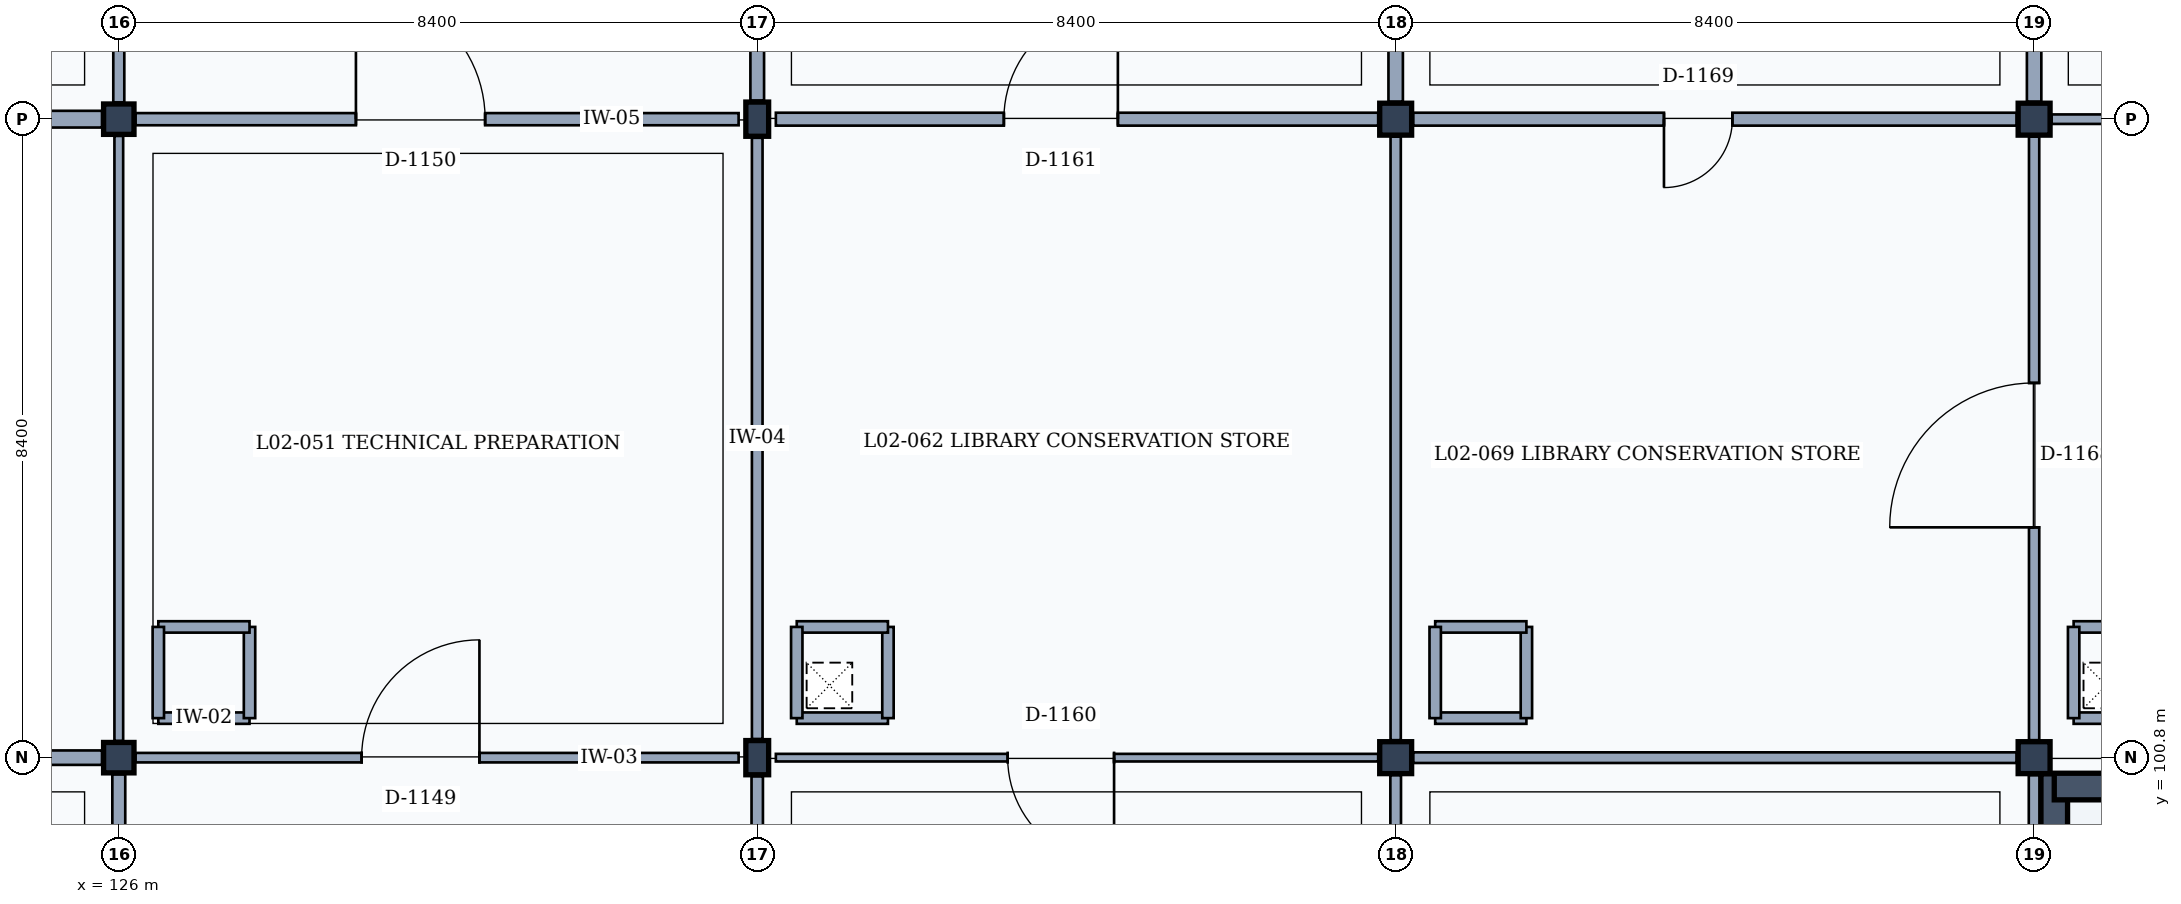
"""IFC4 building model, lengths in metres.
Left out: names, types, materials, properties, quantities, classifications, styles, units other than length and angle.
Written with IfcOpenShell. Run it as: python <this file> out.ifc"""

import sys

from ifc_helpers import new_model, si_unit, direction, frame, frame_2d, origin, origin_2d, place, context, subcontext, project, spatial, rectangle, i_section, extrude, element, fill, save


model = new_model("IFC4")
c1 = context("Model", 3, precision=1e-05, world=origin(), true_north=direction((0.0, 1.0)))
c2 = subcontext(c1, "Body", "Model", "MODEL_VIEW")
j1 = project(units=[si_unit("LENGTHUNIT", "METRE"), si_unit("PLANEANGLEUNIT", "RADIAN")], contexts=[c1])
p1 = place(None, origin())
s1 = spatial("IfcSite", under=j1, at=p1, CompositionType="ELEMENT")
p2 = place(p1, origin())
s2 = spatial("IfcBuilding", under=s1, at=p2, CompositionType="ELEMENT")
p3 = place(p2, frame((0.0, 0.0, 9.6)))
s3 = spatial("IfcBuildingStorey", under=s2, at=p3, CompositionType="ELEMENT", Elevation=9.6)
for number, where, z_axis, x_axis in (
    (1, (126.0, 100.8, 0.0), (0.0, 0.0, 1.0), (1.0, 0.0, 0.0)),
    (2, (126.0, 109.2, 0.0), (0.0, 0.0, 1.0), (1.0, 0.0, 0.0)),
):
    element("IfcColumn", number, at=place(p3, frame(where, z_axis=z_axis, x_axis=x_axis)), inside=s3, PredefinedType="COLUMN", context=c2, shape_type="SweptSolid", body=[
        extrude(rectangle(XDim=0.4, YDim=0.4, at=origin_2d()), origin(), (0.0, 0.0, 1.0), 4.2),
    ])
for number, where, z_axis, x_axis in (
    (3, (134.4, 100.8, 0.0), (0.0, 0.0, 1.0), (1.0, 0.0, 0.0)),
    (4, (134.4, 109.2, 0.0), (0.0, 0.0, 1.0), (1.0, 0.0, 0.0)),
):
    element("IfcColumn", number, at=place(p3, frame(where, z_axis=z_axis, x_axis=x_axis)), inside=s3, PredefinedType="COLUMN", context=c2, shape_type="SweptSolid", body=[
        extrude(i_section(OverallWidth=0.3, OverallDepth=0.45, WebThickness=0.014, FlangeThickness=0.026, FilletRadius=0.027, at=origin_2d()), origin(), (0.0, 0.0, 1.0), 4.2),
    ])
for number, where, z_axis, x_axis in (
    (5, (142.8, 100.8, 0.0), (0.0, 0.0, 1.0), (1.0, 0.0, 0.0)),
    (6, (142.8, 109.2, 0.0), (0.0, 0.0, 1.0), (1.0, 0.0, 0.0)),
    (7, (151.2, 100.8, 0.0), (0.0, 0.0, 1.0), (1.0, 0.0, 0.0)),
    (8, (151.2, 109.2, 0.0), (0.0, 0.0, 1.0), (1.0, 0.0, 0.0)),
):
    element("IfcColumn", number, at=place(p3, frame(where, z_axis=z_axis, x_axis=x_axis)), inside=s3, PredefinedType="COLUMN", context=c2, shape_type="SweptSolid", body=[
        extrude(rectangle(XDim=0.42, YDim=0.42, at=origin_2d()), origin(), (0.0, 0.0, 1.0), 4.2),
    ])
p4 = place(p3, frame((151.465, 92.65, 0.0), z_axis=(0.0, 0.0, 1.0), x_axis=(0.0, 1.0, 0.0)))
e9 = element("IfcWall", 9, at=p4, inside=s3, PredefinedType="SHEAR", context=c2, shape_type="SweptSolid", body=[
    extrude(rectangle(XDim=7.94, YDim=0.35, at=frame_2d((3.97, 0.0))), origin(), (0.0, 0.0, 1.0), 3.96),
])
p5 = place(p3, frame((151.465, 100.42, 0.0), z_axis=(0.0, 0.0, 1.0), x_axis=(1.0, 0.0, 0.0)))
e10 = element("IfcWall", 10, at=p5, inside=s3, PredefinedType="SHEAR", context=c2, shape_type="SweptSolid", body=[
    extrude(rectangle(XDim=7.875, YDim=0.35, at=frame_2d((3.938, 0.0))), origin(), (0.0, 0.0, 1.0), 3.96),
])
for number, where, z_axis, x_axis in (
    (11, (126.52, 101.32, 0.0), (0.0, 0.0, 1.0), (1.0, 0.0, 0.0)),
    (12, (127.72, 101.32, 0.0), (0.0, 0.0, 1.0), (0.0, 1.0, 0.0)),
    (13, (127.72, 102.52, 0.0), (0.0, 0.0, 1.0), (-1.0, 0.0, 0.0)),
    (14, (126.52, 102.52, 0.0), (0.0, 0.0, 1.0), (0.0, -1.0, 0.0)),
):
    element("IfcWall", number, at=place(p3, frame(where, z_axis=z_axis, x_axis=x_axis)), inside=s3, PredefinedType="PARTITIONING", context=c2, shape_type="SweptSolid", body=[
        extrude(rectangle(XDim=1.2, YDim=0.15, at=frame_2d((0.6, 0.0))), origin(), (0.0, 0.0, 1.0), 3.96),
    ])
p6 = place(p3, frame((134.92, 101.32, 0.0), z_axis=(0.0, 0.0, 1.0), x_axis=(1.0, 0.0, 0.0)))
e15 = element("IfcWall", 15, at=p6, inside=s3, PredefinedType="PARTITIONING", context=c2, shape_type="SweptSolid", body=[
    extrude(rectangle(XDim=1.2, YDim=0.15, at=frame_2d((0.6, 0.0))), origin(), (0.0, 0.0, 1.0), 3.94),
])
p7 = place(p3, frame((136.12, 101.32, 0.0), z_axis=(0.0, 0.0, 1.0), x_axis=(0.0, 1.0, 0.0)))
e16 = element("IfcWall", 16, at=p7, inside=s3, PredefinedType="PARTITIONING", context=c2, shape_type="SweptSolid", body=[
    extrude(rectangle(XDim=1.2, YDim=0.15, at=frame_2d((0.6, 0.0))), origin(), (0.0, 0.0, 1.0), 3.94),
])
p8 = place(p3, frame((136.12, 102.52, 0.0), z_axis=(0.0, 0.0, 1.0), x_axis=(-1.0, 0.0, 0.0)))
e17 = element("IfcWall", 17, at=p8, inside=s3, PredefinedType="PARTITIONING", context=c2, shape_type="SweptSolid", body=[
    extrude(rectangle(XDim=1.2, YDim=0.15, at=frame_2d((0.6, 0.0))), origin(), (0.0, 0.0, 1.0), 3.94),
])
p9 = place(p3, frame((134.92, 102.52, 0.0), z_axis=(0.0, 0.0, 1.0), x_axis=(0.0, -1.0, 0.0)))
e18 = element("IfcWall", 18, at=p9, inside=s3, PredefinedType="PARTITIONING", context=c2, shape_type="SweptSolid", body=[
    extrude(rectangle(XDim=1.2, YDim=0.15, at=frame_2d((0.6, 0.0))), origin(), (0.0, 0.0, 1.0), 3.94),
])
for number, where, z_axis, x_axis in (
    (19, (143.32, 101.32, 0.0), (0.0, 0.0, 1.0), (1.0, 0.0, 0.0)),
    (20, (144.52, 101.32, 0.0), (0.0, 0.0, 1.0), (0.0, 1.0, 0.0)),
    (21, (144.52, 102.52, 0.0), (0.0, 0.0, 1.0), (-1.0, 0.0, 0.0)),
    (22, (143.32, 102.52, 0.0), (0.0, 0.0, 1.0), (0.0, -1.0, 0.0)),
    (23, (151.72, 101.32, 0.0), (0.0, 0.0, 1.0), (1.0, 0.0, 0.0)),
    (24, (152.92, 102.52, 0.0), (0.0, 0.0, 1.0), (-1.0, 0.0, 0.0)),
    (25, (151.72, 102.52, 0.0), (0.0, 0.0, 1.0), (0.0, -1.0, 0.0)),
):
    element("IfcWall", number, at=place(p3, frame(where, z_axis=z_axis, x_axis=x_axis)), inside=s3, PredefinedType="PARTITIONING", context=c2, shape_type="SweptSolid", body=[
        extrude(rectangle(XDim=1.2, YDim=0.15, at=frame_2d((0.6, 0.0))), origin(), (0.0, 0.0, 1.0), 3.96),
    ])
p10 = place(p3, frame((126.0, 92.62, 0.0), z_axis=(0.0, 0.0, 1.0), x_axis=(0.0, 1.0, 0.0)))
e26 = element("IfcWall", 26, at=p10, inside=s3, PredefinedType="PARTITIONING", context=c2, shape_type="SweptSolid", body=[
    extrude(rectangle(XDim=7.96, YDim=0.17, at=frame_2d((3.98, 0.0))), origin(), (0.0, 0.0, 1.0), 3.32),
])
p11 = place(p3, frame((117.745, 100.8, 0.0), z_axis=(0.0, 0.0, 1.0), x_axis=(1.0, 0.0, 0.0)))
e27 = element("IfcWall", 27, at=p11, inside=s3, PredefinedType="PARTITIONING", context=c2, shape_type="SweptSolid", body=[
    extrude(rectangle(XDim=8.035, YDim=0.19, at=frame_2d((4.018, 0.0))), origin(), (0.0, 0.0, 1.0), 3.32),
])
p12 = place(p11, frame((2.925, 0.0, 0.0)))
e28 = element("IfcOpeningElement", 28, at=p12, cuts=e27, PredefinedType="OPENING", context=c2, shape_type="SweptSolid", body=[
    extrude(rectangle(XDim=1.65, YDim=2.25, at=frame_2d((0.825, 1.125))), frame((0.0, 0.105, 0.0), z_axis=(0.0, -1.0, 0.0), x_axis=(1.0, 0.0, 0.0)), (0.0, 0.0, 1.0), 0.21),
])
p13 = place(p3, frame((126.0, 101.02, 0.0), z_axis=(0.0, 0.0, 1.0), x_axis=(0.0, 1.0, 0.0)))
e29 = element("IfcWall", 29, at=p13, inside=s3, PredefinedType="PARTITIONING", context=c2, shape_type="SweptSolid", body=[
    extrude(rectangle(XDim=7.96, YDim=0.115, at=frame_2d((3.98, 0.0))), origin(), (0.0, 0.0, 1.0), 3.32),
])
p14 = place(p3, frame((117.745, 109.2, 0.0), z_axis=(0.0, 0.0, 1.0), x_axis=(1.0, 0.0, 0.0)))
e30 = element("IfcWall", 30, at=p14, inside=s3, PredefinedType="PARTITIONING", context=c2, shape_type="SweptSolid", body=[
    extrude(rectangle(XDim=8.035, YDim=0.22, at=frame_2d((4.018, 0.0))), origin(), (0.0, 0.0, 1.0), 3.32),
])
p15 = place(p14, frame((3.225, 0.0, 0.0)))
e31 = element("IfcOpeningElement", 31, at=p15, cuts=e30, PredefinedType="OPENING", context=c2, shape_type="SweptSolid", body=[
    extrude(rectangle(XDim=1.05, YDim=2.2, at=frame_2d((0.525, 1.1))), frame((0.0, 0.12, 0.0), z_axis=(0.0, -1.0, 0.0), x_axis=(1.0, 0.0, 0.0)), (0.0, 0.0, 1.0), 0.24),
])
p16 = place(p3, frame((126.0, 109.42, 0.0), z_axis=(0.0, 0.0, 1.0), x_axis=(0.0, 1.0, 0.0)))
e32 = element("IfcWall", 32, at=p16, inside=s3, PredefinedType="PARTITIONING", context=c2, shape_type="SweptSolid", body=[
    extrude(rectangle(XDim=7.96, YDim=0.145, at=frame_2d((3.98, 0.0))), origin(), (0.0, 0.0, 1.0), 3.32),
])
p17 = place(p3, frame((134.4, 92.645, 0.0), z_axis=(0.0, 0.0, 1.0), x_axis=(0.0, 1.0, 0.0)))
e33 = element("IfcWall", 33, at=p17, inside=s3, PredefinedType="PARTITIONING", context=c2, shape_type="SweptSolid", body=[
    extrude(rectangle(XDim=7.91, YDim=0.15, at=frame_2d((3.955, 0.0))), origin(), (0.0, 0.0, 1.0), 3.32),
])
p18 = place(p3, frame((126.22, 100.8, 0.0), z_axis=(0.0, 0.0, 1.0), x_axis=(1.0, 0.0, 0.0)))
e34 = element("IfcWall", 34, at=p18, inside=s3, PredefinedType="PARTITIONING", context=c2, shape_type="SweptSolid", body=[
    extrude(rectangle(XDim=7.935, YDim=0.125, at=frame_2d((3.968, 0.0))), origin(), (0.0, 0.0, 1.0), 3.32),
])
p19 = place(p18, frame((2.975, 0.0, 0.0)))
e35 = element("IfcOpeningElement", 35, at=p19, cuts=e34, PredefinedType="OPENING", context=c2, shape_type="SweptSolid", body=[
    extrude(rectangle(XDim=1.55, YDim=2.35, at=frame_2d((0.775, 1.175))), frame((0.0, 0.073, 0.0), z_axis=(0.0, -1.0, 0.0), x_axis=(1.0, 0.0, 0.0)), (0.0, 0.0, 1.0), 0.145),
])
p20 = place(p3, frame((134.4, 101.045, 0.0), z_axis=(0.0, 0.0, 1.0), x_axis=(0.0, 1.0, 0.0)))
e36 = element("IfcWall", 36, at=p20, inside=s3, PredefinedType="PARTITIONING", context=c2, shape_type="SweptSolid", body=[
    extrude(rectangle(XDim=7.91, YDim=0.14, at=frame_2d((3.955, 0.0))), origin(), (0.0, 0.0, 1.0), 3.32),
])
p21 = place(p3, frame((126.22, 109.2, 0.0), z_axis=(0.0, 0.0, 1.0), x_axis=(1.0, 0.0, 0.0)))
e37 = element("IfcWall", 37, at=p21, inside=s3, PredefinedType="PARTITIONING", context=c2, shape_type="SweptSolid", body=[
    extrude(rectangle(XDim=7.935, YDim=0.16, at=frame_2d((3.968, 0.0))), origin(), (0.0, 0.0, 1.0), 3.32),
])
p22 = place(p21, frame((2.9, 0.0, 0.0)))
e38 = element("IfcOpeningElement", 38, at=p22, cuts=e37, PredefinedType="OPENING", context=c2, shape_type="SweptSolid", body=[
    extrude(rectangle(XDim=1.7, YDim=2.3, at=frame_2d((0.85, 1.15))), frame((0.0, 0.09, 0.0), z_axis=(0.0, -1.0, 0.0), x_axis=(1.0, 0.0, 0.0)), (0.0, 0.0, 1.0), 0.18),
])
p23 = place(p3, frame((134.4, 109.445, 0.0), z_axis=(0.0, 0.0, 1.0), x_axis=(0.0, 1.0, 0.0)))
e39 = element("IfcWall", 39, at=p23, inside=s3, PredefinedType="PARTITIONING", context=c2, shape_type="SweptSolid", body=[
    extrude(rectangle(XDim=7.91, YDim=0.18, at=frame_2d((3.955, 0.0))), origin(), (0.0, 0.0, 1.0), 3.32),
])
p24 = place(p3, frame((142.8, 92.63, 0.0), z_axis=(0.0, 0.0, 1.0), x_axis=(0.0, 1.0, 0.0)))
e40 = element("IfcWall", 40, at=p24, inside=s3, PredefinedType="PARTITIONING", context=c2, shape_type="SweptSolid", body=[
    extrude(rectangle(XDim=7.94, YDim=0.14, at=frame_2d((3.97, 0.0))), origin(), (0.0, 0.0, 1.0), 3.32),
])
p25 = place(p3, frame((134.645, 100.8, 0.0), z_axis=(0.0, 0.0, 1.0), x_axis=(1.0, 0.0, 0.0)))
e41 = element("IfcWall", 41, at=p25, inside=s3, PredefinedType="MOVABLE", context=c2, shape_type="SweptSolid", body=[
    extrude(rectangle(XDim=7.925, YDim=0.1, at=frame_2d((3.962, 0.0))), origin(), (0.0, 0.0, 1.0), 3.32),
])
p26 = place(p25, frame((3.05, 0.0, 0.0)))
e42 = element("IfcOpeningElement", 42, at=p26, cuts=e41, PredefinedType="OPENING", context=c2, shape_type="SweptSolid", body=[
    extrude(rectangle(XDim=1.4, YDim=2.25, at=frame_2d((0.7, 1.125))), frame((0.0, 0.06, 0.0), z_axis=(0.0, -1.0, 0.0), x_axis=(1.0, 0.0, 0.0)), (0.0, 0.0, 1.0), 0.12),
])
p27 = place(p3, frame((142.8, 101.03, 0.0), z_axis=(0.0, 0.0, 1.0), x_axis=(0.0, 1.0, 0.0)))
e43 = element("IfcWall", 43, at=p27, inside=s3, PredefinedType="PARTITIONING", context=c2, shape_type="SweptSolid", body=[
    extrude(rectangle(XDim=7.94, YDim=0.135, at=frame_2d((3.97, 0.0))), origin(), (0.0, 0.0, 1.0), 3.32),
])
p28 = place(p3, frame((134.645, 109.2, 0.0), z_axis=(0.0, 0.0, 1.0), x_axis=(1.0, 0.0, 0.0)))
e44 = element("IfcWall", 44, at=p28, inside=s3, PredefinedType="PARTITIONING", context=c2, shape_type="SweptSolid", body=[
    extrude(rectangle(XDim=7.925, YDim=0.17, at=frame_2d((3.962, 0.0))), origin(), (0.0, 0.0, 1.0), 3.32),
])
p29 = place(p28, frame((3.0, 0.0, 0.0)))
e45 = element("IfcOpeningElement", 45, at=p29, cuts=e44, PredefinedType="OPENING", context=c2, shape_type="SweptSolid", body=[
    extrude(rectangle(XDim=1.5, YDim=2.3, at=frame_2d((0.75, 1.15))), frame((0.0, 0.095, 0.0), z_axis=(0.0, -1.0, 0.0), x_axis=(1.0, 0.0, 0.0)), (0.0, 0.0, 1.0), 0.19),
])
p30 = place(p3, frame((142.8, 109.43, 0.0), z_axis=(0.0, 0.0, 1.0), x_axis=(0.0, 1.0, 0.0)))
e46 = element("IfcWall", 46, at=p30, inside=s3, PredefinedType="PARTITIONING", context=c2, shape_type="SweptSolid", body=[
    extrude(rectangle(XDim=7.94, YDim=0.19, at=frame_2d((3.97, 0.0))), origin(), (0.0, 0.0, 1.0), 3.32),
])
p31 = place(p3, frame((151.2, 92.63, 0.0), z_axis=(0.0, 0.0, 1.0), x_axis=(0.0, 1.0, 0.0)))
e47 = element("IfcWall", 47, at=p31, inside=s3, PredefinedType="PARTITIONING", context=c2, shape_type="SweptSolid", body=[
    extrude(rectangle(XDim=7.94, YDim=0.14, at=frame_2d((3.97, 0.0))), origin(), (0.0, 0.0, 1.0), 3.32),
])
p32 = place(p3, frame((143.03, 100.8, 0.0), z_axis=(0.0, 0.0, 1.0), x_axis=(1.0, 0.0, 0.0)))
e48 = element("IfcWall", 48, at=p32, inside=s3, PredefinedType="PARTITIONING", context=c2, shape_type="SweptSolid", body=[
    extrude(rectangle(XDim=7.94, YDim=0.14, at=frame_2d((3.97, 0.0))), origin(), (0.0, 0.0, 1.0), 3.22),
])
p33 = place(p3, frame((151.2, 101.03, 0.0), z_axis=(0.0, 0.0, 1.0), x_axis=(0.0, 1.0, 0.0)))
e49 = element("IfcWall", 49, at=p33, inside=s3, PredefinedType="PARTITIONING", context=c2, shape_type="SweptSolid", body=[
    extrude(rectangle(XDim=7.94, YDim=0.135, at=frame_2d((3.97, 0.0))), origin(), (0.0, 0.0, 1.0), 3.32),
])
p34 = place(p33, frame((2.8, 0.0, 0.0)))
e50 = element("IfcOpeningElement", 50, at=p34, cuts=e49, PredefinedType="OPENING", context=c2, shape_type="SweptSolid", body=[
    extrude(rectangle(XDim=1.9, YDim=2.4, at=frame_2d((0.95, 1.2))), frame((0.0, 0.077, 0.0), z_axis=(0.0, -1.0, 0.0), x_axis=(1.0, 0.0, 0.0)), (0.0, 0.0, 1.0), 0.155),
])
p35 = place(p3, frame((143.03, 109.2, 0.0), z_axis=(0.0, 0.0, 1.0), x_axis=(1.0, 0.0, 0.0)))
e51 = element("IfcWall", 51, at=p35, inside=s3, PredefinedType="PARTITIONING", context=c2, shape_type="SweptSolid", body=[
    extrude(rectangle(XDim=7.94, YDim=0.17, at=frame_2d((3.97, 0.0))), origin(), (0.0, 0.0, 1.0), 3.21),
])
p36 = place(p35, frame((3.3, 0.0, 0.0)))
e52 = element("IfcOpeningElement", 52, at=p36, cuts=e51, PredefinedType="OPENING", context=c2, shape_type="SweptSolid", body=[
    extrude(rectangle(XDim=0.9, YDim=2.1, at=frame_2d((0.45, 1.05))), frame((0.0, 0.095, 0.0), z_axis=(0.0, -1.0, 0.0), x_axis=(1.0, 0.0, 0.0)), (0.0, 0.0, 1.0), 0.19),
])
p37 = place(p3, frame((151.2, 109.43, 0.0), z_axis=(0.0, 0.0, 1.0), x_axis=(0.0, 1.0, 0.0)))
e53 = element("IfcWall", 53, at=p37, inside=s3, PredefinedType="PARTITIONING", context=c2, shape_type="SweptSolid", body=[
    extrude(rectangle(XDim=7.94, YDim=0.19, at=frame_2d((3.97, 0.0))), origin(), (0.0, 0.0, 1.0), 3.32),
])
p38 = place(p3, frame((151.43, 109.2, 0.0), z_axis=(0.0, 0.0, 1.0), x_axis=(1.0, 0.0, 0.0)))
e54 = element("IfcWall", 54, at=p38, inside=s3, PredefinedType="PARTITIONING", context=c2, shape_type="SweptSolid", body=[
    extrude(rectangle(XDim=7.94, YDim=0.125, at=frame_2d((3.97, 0.0))), origin(), (0.0, 0.0, 1.0), 3.24),
])
p39 = place(p38, frame((3.15, 0.0, 0.0)))
e55 = element("IfcOpeningElement", 55, at=p39, cuts=e54, PredefinedType="OPENING", context=c2, shape_type="SweptSolid", body=[
    extrude(rectangle(XDim=1.2, YDim=2.2, at=frame_2d((0.6, 1.1))), frame((0.0, 0.073, 0.0), z_axis=(0.0, -1.0, 0.0), x_axis=(1.0, 0.0, 0.0)), (0.0, 0.0, 1.0), 0.145),
])
p40 = place(p19, origin())
e56 = element("IfcDoor", 56, at=p40, inside=s3, OperationType="SINGLE_SWING_RIGHT", PredefinedType="DOOR", context=c2, shape_type="SweptSolid", body=[
    extrude(rectangle(XDim=1.55, YDim=2.35, at=frame_2d((0.775, 1.175))), frame((0.0, 0.025, 0.0), z_axis=(0.0, -1.0, 0.0), x_axis=(1.0, 0.0, 0.0)), (0.0, 0.0, 1.0), 0.05),
])
fill(e35, e56)
p41 = place(p22, origin())
e57 = element("IfcDoor", 57, at=p41, inside=s3, OperationType="SINGLE_SWING_LEFT", PredefinedType="DOOR", context=c2, shape_type="SweptSolid", body=[
    extrude(rectangle(XDim=1.7, YDim=2.3, at=frame_2d((0.85, 1.15))), frame((0.0, 0.025, 0.0), z_axis=(0.0, -1.0, 0.0), x_axis=(1.0, 0.0, 0.0)), (0.0, 0.0, 1.0), 0.05),
])
fill(e38, e57)
p42 = place(p26, frame((1.4, 0.0, 0.0), z_axis=(0.0, 0.0, 1.0), x_axis=(-1.0, 0.0, 0.0)))
e58 = element("IfcDoor", 58, at=p42, inside=s3, OperationType="SINGLE_SWING_LEFT", PredefinedType="DOOR", context=c2, shape_type="SweptSolid", body=[
    extrude(rectangle(XDim=1.4, YDim=2.25, at=frame_2d((0.7, 1.125))), frame((0.0, 0.025, 0.0), z_axis=(0.0, -1.0, 0.0), x_axis=(1.0, 0.0, 0.0)), (0.0, 0.0, 1.0), 0.05),
])
fill(e42, e58)
p43 = place(p29, origin())
e59 = element("IfcDoor", 59, at=p43, inside=s3, OperationType="SINGLE_SWING_RIGHT", PredefinedType="DOOR", context=c2, shape_type="SweptSolid", body=[
    extrude(rectangle(XDim=1.5, YDim=2.3, at=frame_2d((0.75, 1.15))), frame((0.0, 0.025, 0.0), z_axis=(0.0, -1.0, 0.0), x_axis=(1.0, 0.0, 0.0)), (0.0, 0.0, 1.0), 0.05),
])
fill(e45, e59)
p44 = place(p34, origin())
e60 = element("IfcDoor", 60, at=p44, inside=s3, OperationType="SINGLE_SWING_LEFT", PredefinedType="DOOR", context=c2, shape_type="SweptSolid", body=[
    extrude(rectangle(XDim=1.9, YDim=2.4, at=frame_2d((0.95, 1.2))), frame((0.0, 0.025, 0.0), z_axis=(0.0, -1.0, 0.0), x_axis=(1.0, 0.0, 0.0)), (0.0, 0.0, 1.0), 0.05),
])
fill(e50, e60)
p45 = place(p36, frame((0.9, 0.0, 0.0), z_axis=(0.0, 0.0, 1.0), x_axis=(-1.0, 0.0, 0.0)))
e61 = element("IfcDoor", 61, at=p45, inside=s3, OperationType="SINGLE_SWING_RIGHT", PredefinedType="DOOR", context=c2, shape_type="SweptSolid", body=[
    extrude(rectangle(XDim=0.9, YDim=2.1, at=frame_2d((0.45, 1.05))), frame((0.0, 0.025, 0.0), z_axis=(0.0, -1.0, 0.0), x_axis=(1.0, 0.0, 0.0)), (0.0, 0.0, 1.0), 0.05),
])
fill(e52, e61)
save(model, sys.argv[1])
